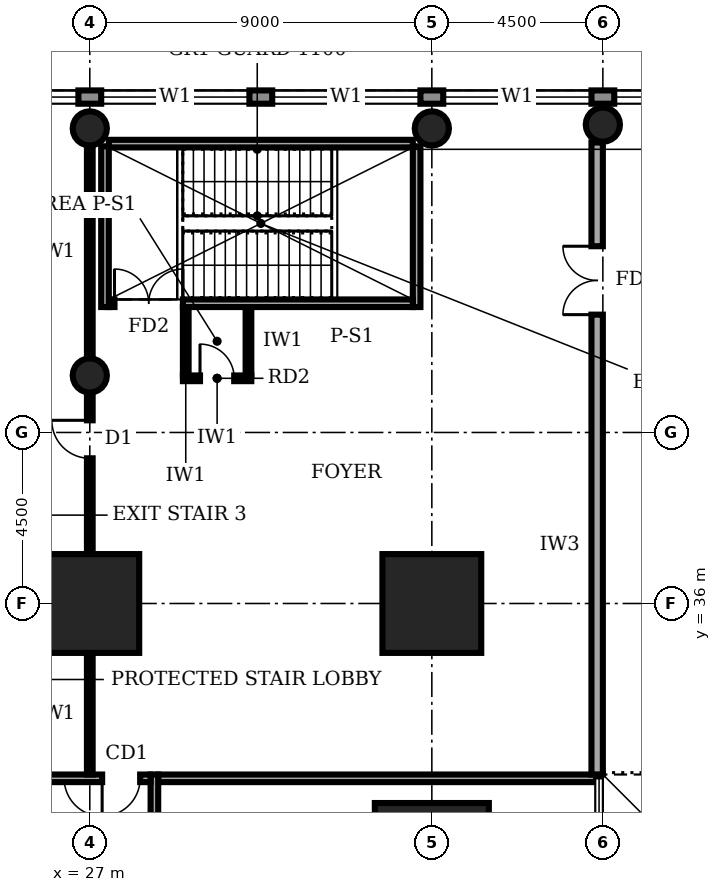
"""IFC4 building model, lengths in metres.
Left out: names, types, materials, properties, quantities, classifications, styles, units other than length and angle.
Written with IfcOpenShell. Run it as: python <this file> out.ifc"""

import sys

from ifc_helpers import new_model, si_unit, direction, frame, frame_2d, origin, origin_2d, place, context, subcontext, project, spatial, rectangle, circle, extrude, element, fill, save


model = new_model("IFC4")
c1 = context("Model", 3, precision=1e-05, world=origin(), true_north=direction((0.0, 1.0)))
c2 = subcontext(c1, "Body", "Model", "MODEL_VIEW")
j1 = project(units=[si_unit("LENGTHUNIT", "METRE"), si_unit("PLANEANGLEUNIT", "RADIAN")], contexts=[c1])
p1 = place(None, origin())
s1 = spatial("IfcSite", under=j1, at=p1, CompositionType="ELEMENT")
p2 = place(p1, origin())
s2 = spatial("IfcBuilding", under=s1, at=p2, CompositionType="ELEMENT")
p3 = place(p2, frame((0.0, 0.0, 11.0)))
s3 = spatial("IfcBuildingStorey", under=s2, at=p3, CompositionType="ELEMENT", Elevation=11.0)
p4 = place(p3, frame((36.0, 29.25, 0.0), z_axis=(0.0, 0.0, 1.0), x_axis=(1.0, 0.0, 0.0)))
e1 = element("IfcColumn", 1, at=p4, inside=s3, PredefinedType="COLUMN", context=c2, shape_type="SweptSolid", body=[
    extrude(rectangle(XDim=3.0, YDim=3.0, at=origin_2d()), origin(), (0.0, 0.0, 1.0), 5.0),
])
for number, where, z_axis, x_axis in (
    (2, (27.0, 36.0, 0.0), (0.0, 0.0, 1.0), (1.0, 0.0, 0.0)),
    (3, (36.0, 36.0, 0.0), (0.0, 0.0, 1.0), (1.0, 0.0, 0.0)),
):
    element("IfcColumn", number, at=place(p3, frame(where, z_axis=z_axis, x_axis=x_axis)), inside=s3, PredefinedType="COLUMN", context=c2, shape_type="SweptSolid", body=[
        extrude(rectangle(XDim=2.6, YDim=2.6, at=origin_2d()), origin(), (0.0, 0.0, 1.0), 5.0),
    ])
for number, where, z_axis, x_axis in (
    (4, (27.0, 42.0, 0.0), (0.0, 0.0, 1.0), (1.0, 0.0, 0.0)),
    (5, (27.0, 48.5, 0.0), (0.0, 0.0, 1.0), (1.0, 0.0, 0.0)),
    (6, (36.0, 48.5, 0.0), (0.0, 0.0, 1.0), (1.0, 0.0, 0.0)),
    (7, (40.5, 48.6, 0.0), (0.0, 0.0, 1.0), (1.0, 0.0, 0.0)),
):
    element("IfcColumn", number, at=place(p3, frame(where, z_axis=z_axis, x_axis=x_axis)), inside=s3, PredefinedType="COLUMN", context=c2, shape_type="SweptSolid", body=[
        extrude(circle(Radius=0.45, at=origin_2d()), origin(), (0.0, 0.0, 1.0), 5.0),
    ])
p5 = place(p3, frame((98.98, 49.325, 0.0), z_axis=(0.0, 0.0, 1.0), x_axis=(-1.0, 0.0, 0.0)))
e8 = element("IfcWall", 8, at=p5, inside=s3, PredefinedType="STANDARD", context=c2, shape_type="SweptSolid", body=[
    extrude(rectangle(XDim=98.96, YDim=0.35, at=frame_2d((49.48, 0.0))), origin(), (0.0, 0.0, 1.0), 4.7),
])
p6 = place(p5, frame((94.71, 0.0, 0.9)))
e9 = element("IfcOpeningElement", 9, at=p6, cuts=e8, PredefinedType="OPENING", context=c2, shape_type="SweptSolid", body=[
    extrude(rectangle(XDim=3.9, YDim=2.2, at=frame_2d((1.95, 1.1))), frame((0.0, 0.185, 0.0), z_axis=(0.0, -1.0, 0.0), x_axis=(1.0, 0.0, 0.0)), (0.0, 0.0, 1.0), 0.37),
])
p7 = place(p5, frame((90.28, 0.0, 0.9)))
e10 = element("IfcOpeningElement", 10, at=p7, cuts=e8, PredefinedType="OPENING", context=c2, shape_type="SweptSolid", body=[
    extrude(rectangle(XDim=3.9, YDim=2.2, at=frame_2d((1.95, 1.1))), frame((0.0, 0.185, 0.0), z_axis=(0.0, -1.0, 0.0), x_axis=(1.0, 0.0, 0.0)), (0.0, 0.0, 1.0), 0.37),
])
p8 = place(p5, frame((85.78, 0.0, 0.9)))
e11 = element("IfcOpeningElement", 11, at=p8, cuts=e8, PredefinedType="OPENING", context=c2, shape_type="SweptSolid", body=[
    extrude(rectangle(XDim=3.9, YDim=2.2, at=frame_2d((1.95, 1.1))), frame((0.0, 0.185, 0.0), z_axis=(0.0, -1.0, 0.0), x_axis=(1.0, 0.0, 0.0)), (0.0, 0.0, 1.0), 0.37),
])
p9 = place(p5, frame((81.28, 0.0, 0.9)))
e12 = element("IfcOpeningElement", 12, at=p9, cuts=e8, PredefinedType="OPENING", context=c2, shape_type="SweptSolid", body=[
    extrude(rectangle(XDim=3.9, YDim=2.2, at=frame_2d((1.95, 1.1))), frame((0.0, 0.185, 0.0), z_axis=(0.0, -1.0, 0.0), x_axis=(1.0, 0.0, 0.0)), (0.0, 0.0, 1.0), 0.37),
])
p10 = place(p5, frame((76.78, 0.0, 0.9)))
e13 = element("IfcOpeningElement", 13, at=p10, cuts=e8, PredefinedType="OPENING", context=c2, shape_type="SweptSolid", body=[
    extrude(rectangle(XDim=3.9, YDim=2.2, at=frame_2d((1.95, 1.1))), frame((0.0, 0.185, 0.0), z_axis=(0.0, -1.0, 0.0), x_axis=(1.0, 0.0, 0.0)), (0.0, 0.0, 1.0), 0.37),
])
p11 = place(p5, frame((72.28, 0.0, 0.9)))
e14 = element("IfcOpeningElement", 14, at=p11, cuts=e8, PredefinedType="OPENING", context=c2, shape_type="SweptSolid", body=[
    extrude(rectangle(XDim=3.9, YDim=2.2, at=frame_2d((1.95, 1.1))), frame((0.0, 0.185, 0.0), z_axis=(0.0, -1.0, 0.0), x_axis=(1.0, 0.0, 0.0)), (0.0, 0.0, 1.0), 0.37),
])
p12 = place(p5, frame((67.78, 0.0, 0.9)))
e15 = element("IfcOpeningElement", 15, at=p12, cuts=e8, PredefinedType="OPENING", context=c2, shape_type="SweptSolid", body=[
    extrude(rectangle(XDim=3.9, YDim=2.2, at=frame_2d((1.95, 1.1))), frame((0.0, 0.185, 0.0), z_axis=(0.0, -1.0, 0.0), x_axis=(1.0, 0.0, 0.0)), (0.0, 0.0, 1.0), 0.37),
])
p13 = place(p5, frame((63.28, 0.0, 0.9)))
e16 = element("IfcOpeningElement", 16, at=p13, cuts=e8, PredefinedType="OPENING", context=c2, shape_type="SweptSolid", body=[
    extrude(rectangle(XDim=3.9, YDim=2.2, at=frame_2d((1.95, 1.1))), frame((0.0, 0.185, 0.0), z_axis=(0.0, -1.0, 0.0), x_axis=(1.0, 0.0, 0.0)), (0.0, 0.0, 1.0), 0.37),
])
p14 = place(p5, frame((58.78, 0.0, 0.9)))
e17 = element("IfcOpeningElement", 17, at=p14, cuts=e8, PredefinedType="OPENING", context=c2, shape_type="SweptSolid", body=[
    extrude(rectangle(XDim=3.9, YDim=2.2, at=frame_2d((1.95, 1.1))), frame((0.0, 0.185, 0.0), z_axis=(0.0, -1.0, 0.0), x_axis=(1.0, 0.0, 0.0)), (0.0, 0.0, 1.0), 0.37),
])
p15 = place(p5, frame((54.28, 0.0, 0.9)))
e18 = element("IfcOpeningElement", 18, at=p15, cuts=e8, PredefinedType="OPENING", context=c2, shape_type="SweptSolid", body=[
    extrude(rectangle(XDim=3.9, YDim=2.2, at=frame_2d((1.95, 1.1))), frame((0.0, 0.185, 0.0), z_axis=(0.0, -1.0, 0.0), x_axis=(1.0, 0.0, 0.0)), (0.0, 0.0, 1.0), 0.37),
])
p16 = place(p5, frame((49.78, 0.0, 0.9)))
e19 = element("IfcOpeningElement", 19, at=p16, cuts=e8, PredefinedType="OPENING", context=c2, shape_type="SweptSolid", body=[
    extrude(rectangle(XDim=3.9, YDim=2.2, at=frame_2d((1.95, 1.1))), frame((0.0, 0.185, 0.0), z_axis=(0.0, -1.0, 0.0), x_axis=(1.0, 0.0, 0.0)), (0.0, 0.0, 1.0), 0.37),
])
p17 = place(p5, frame((45.28, 0.0, 0.9)))
e20 = element("IfcOpeningElement", 20, at=p17, cuts=e8, PredefinedType="OPENING", context=c2, shape_type="SweptSolid", body=[
    extrude(rectangle(XDim=3.9, YDim=2.2, at=frame_2d((1.95, 1.1))), frame((0.0, 0.185, 0.0), z_axis=(0.0, -1.0, 0.0), x_axis=(1.0, 0.0, 0.0)), (0.0, 0.0, 1.0), 0.37),
])
p18 = place(p5, frame((40.78, 0.0, 0.9)))
e21 = element("IfcOpeningElement", 21, at=p18, cuts=e8, PredefinedType="OPENING", context=c2, shape_type="SweptSolid", body=[
    extrude(rectangle(XDim=3.9, YDim=2.2, at=frame_2d((1.95, 1.1))), frame((0.0, 0.185, 0.0), z_axis=(0.0, -1.0, 0.0), x_axis=(1.0, 0.0, 0.0)), (0.0, 0.0, 1.0), 0.37),
])
p19 = place(p5, frame((36.28, 0.0, 0.9)))
e22 = element("IfcOpeningElement", 22, at=p19, cuts=e8, PredefinedType="OPENING", context=c2, shape_type="SweptSolid", body=[
    extrude(rectangle(XDim=3.9, YDim=2.2, at=frame_2d((1.95, 1.1))), frame((0.0, 0.185, 0.0), z_axis=(0.0, -1.0, 0.0), x_axis=(1.0, 0.0, 0.0)), (0.0, 0.0, 1.0), 0.37),
])
p20 = place(p5, frame((31.78, 0.0, 0.9)))
e23 = element("IfcOpeningElement", 23, at=p20, cuts=e8, PredefinedType="OPENING", context=c2, shape_type="SweptSolid", body=[
    extrude(rectangle(XDim=3.9, YDim=2.2, at=frame_2d((1.95, 1.1))), frame((0.0, 0.185, 0.0), z_axis=(0.0, -1.0, 0.0), x_axis=(1.0, 0.0, 0.0)), (0.0, 0.0, 1.0), 0.37),
])
p21 = place(p5, frame((27.28, 0.0, 0.9)))
e24 = element("IfcOpeningElement", 24, at=p21, cuts=e8, PredefinedType="OPENING", context=c2, shape_type="SweptSolid", body=[
    extrude(rectangle(XDim=3.9, YDim=2.2, at=frame_2d((1.95, 1.1))), frame((0.0, 0.185, 0.0), z_axis=(0.0, -1.0, 0.0), x_axis=(1.0, 0.0, 0.0)), (0.0, 0.0, 1.0), 0.37),
])
p22 = place(p5, frame((22.78, 0.0, 0.9)))
e25 = element("IfcOpeningElement", 25, at=p22, cuts=e8, PredefinedType="OPENING", context=c2, shape_type="SweptSolid", body=[
    extrude(rectangle(XDim=3.9, YDim=2.2, at=frame_2d((1.95, 1.1))), frame((0.0, 0.185, 0.0), z_axis=(0.0, -1.0, 0.0), x_axis=(1.0, 0.0, 0.0)), (0.0, 0.0, 1.0), 0.37),
])
p23 = place(p5, frame((18.28, 0.0, 0.9)))
e26 = element("IfcOpeningElement", 26, at=p23, cuts=e8, PredefinedType="OPENING", context=c2, shape_type="SweptSolid", body=[
    extrude(rectangle(XDim=3.9, YDim=2.2, at=frame_2d((1.95, 1.1))), frame((0.0, 0.185, 0.0), z_axis=(0.0, -1.0, 0.0), x_axis=(1.0, 0.0, 0.0)), (0.0, 0.0, 1.0), 0.37),
])
p24 = place(p5, frame((13.78, 0.0, 0.9)))
e27 = element("IfcOpeningElement", 27, at=p24, cuts=e8, PredefinedType="OPENING", context=c2, shape_type="SweptSolid", body=[
    extrude(rectangle(XDim=3.9, YDim=2.2, at=frame_2d((1.95, 1.1))), frame((0.0, 0.185, 0.0), z_axis=(0.0, -1.0, 0.0), x_axis=(1.0, 0.0, 0.0)), (0.0, 0.0, 1.0), 0.37),
])
p25 = place(p5, frame((9.28, 0.0, 0.9)))
e28 = element("IfcOpeningElement", 28, at=p25, cuts=e8, PredefinedType="OPENING", context=c2, shape_type="SweptSolid", body=[
    extrude(rectangle(XDim=3.9, YDim=2.2, at=frame_2d((1.95, 1.1))), frame((0.0, 0.185, 0.0), z_axis=(0.0, -1.0, 0.0), x_axis=(1.0, 0.0, 0.0)), (0.0, 0.0, 1.0), 0.37),
])
p26 = place(p5, frame((4.78, 0.0, 0.9)))
e29 = element("IfcOpeningElement", 29, at=p26, cuts=e8, PredefinedType="OPENING", context=c2, shape_type="SweptSolid", body=[
    extrude(rectangle(XDim=3.9, YDim=2.2, at=frame_2d((1.95, 1.1))), frame((0.0, 0.185, 0.0), z_axis=(0.0, -1.0, 0.0), x_axis=(1.0, 0.0, 0.0)), (0.0, 0.0, 1.0), 0.37),
])
p27 = place(p3, frame((28.7, 9.2, 0.0), z_axis=(0.0, 0.0, 1.0), x_axis=(0.0, 1.0, 0.0)))
e30 = element("IfcWall", 30, at=p27, inside=s3, PredefinedType="SOLIDWALL", context=c2, shape_type="SweptSolid", body=[
    extrude(rectangle(XDim=22.3, YDim=0.2, at=frame_2d((11.15, 0.0))), origin(), (0.0, 0.0, 1.0), 4.7),
])
p28 = place(p27, frame((1.55, 0.0, 0.0)))
e31 = element("IfcOpeningElement", 31, at=p28, cuts=e30, PredefinedType="OPENING", context=c2, shape_type="SweptSolid", body=[
    extrude(rectangle(XDim=1.0, YDim=2.1, at=frame_2d((0.5, 1.05))), frame((0.0, 0.11, 0.0), z_axis=(0.0, -1.0, 0.0), x_axis=(1.0, 0.0, 0.0)), (0.0, 0.0, 1.0), 0.22),
])
p29 = place(p27, frame((6.05, 0.0, 0.0)))
e32 = element("IfcOpeningElement", 32, at=p29, cuts=e30, PredefinedType="OPENING", context=c2, shape_type="SweptSolid", body=[
    extrude(rectangle(XDim=1.0, YDim=2.1, at=frame_2d((0.5, 1.05))), frame((0.0, 0.11, 0.0), z_axis=(0.0, -1.0, 0.0), x_axis=(1.0, 0.0, 0.0)), (0.0, 0.0, 1.0), 0.22),
])
p30 = place(p27, frame((12.4, 0.0, 0.0)))
e33 = element("IfcOpeningElement", 33, at=p30, cuts=e30, PredefinedType="OPENING", context=c2, shape_type="SweptSolid", body=[
    extrude(rectangle(XDim=1.8, YDim=2.1, at=frame_2d((0.9, 1.05))), frame((0.0, 0.11, 0.0), z_axis=(0.0, -1.0, 0.0), x_axis=(1.0, 0.0, 0.0)), (0.0, 0.0, 1.0), 0.22),
])
p31 = place(p27, frame((19.55, 0.0, 0.0)))
e34 = element("IfcOpeningElement", 34, at=p31, cuts=e30, PredefinedType="OPENING", context=c2, shape_type="SweptSolid", body=[
    extrude(rectangle(XDim=1.0, YDim=2.1, at=frame_2d((0.5, 1.05))), frame((0.0, 0.11, 0.0), z_axis=(0.0, -1.0, 0.0), x_axis=(1.0, 0.0, 0.0)), (0.0, 0.0, 1.0), 0.22),
])
p32 = place(p3, frame((28.6, 31.4, 0.0), z_axis=(0.0, 0.0, 1.0), x_axis=(-1.0, 0.0, 0.0)))
e35 = element("IfcWall", 35, at=p32, inside=s3, PredefinedType="SOLIDWALL", context=c2, shape_type="SweptSolid", body=[
    extrude(rectangle(XDim=16.9, YDim=0.2, at=frame_2d((8.45, 0.0))), origin(), (0.0, 0.0, 1.0), 4.7),
])
p33 = place(p32, frame((15.425, 0.0, 0.0)))
e36 = element("IfcOpeningElement", 36, at=p33, cuts=e35, PredefinedType="OPENING", context=c2, shape_type="SweptSolid", body=[
    extrude(rectangle(XDim=1.0, YDim=2.1, at=frame_2d((0.5, 1.05))), frame((0.0, 0.11, 0.0), z_axis=(0.0, -1.0, 0.0), x_axis=(1.0, 0.0, 0.0)), (0.0, 0.0, 1.0), 0.22),
])
p34 = place(p32, frame((9.7, 0.0, 0.0)))
e37 = element("IfcOpeningElement", 37, at=p34, cuts=e35, PredefinedType="OPENING", context=c2, shape_type="SweptSolid", body=[
    extrude(rectangle(XDim=1.8, YDim=2.1, at=frame_2d((0.9, 1.05))), frame((0.0, 0.11, 0.0), z_axis=(0.0, -1.0, 0.0), x_axis=(1.0, 0.0, 0.0)), (0.0, 0.0, 1.0), 0.22),
])
p35 = place(p32, frame((3.35, 0.0, 0.0)))
e38 = element("IfcOpeningElement", 38, at=p35, cuts=e35, PredefinedType="OPENING", context=c2, shape_type="SweptSolid", body=[
    extrude(rectangle(XDim=1.0, YDim=2.1, at=frame_2d((0.5, 1.05))), frame((0.0, 0.11, 0.0), z_axis=(0.0, -1.0, 0.0), x_axis=(1.0, 0.0, 0.0)), (0.0, 0.0, 1.0), 0.22),
])
p36 = place(p32, frame((0.275, 0.0, 0.0)))
e39 = element("IfcOpeningElement", 39, at=p36, cuts=e35, PredefinedType="OPENING", context=c2, shape_type="SweptSolid", body=[
    extrude(rectangle(XDim=1.0, YDim=2.1, at=frame_2d((0.5, 1.05))), frame((0.0, 0.11, 0.0), z_axis=(0.0, -1.0, 0.0), x_axis=(1.0, 0.0, 0.0)), (0.0, 0.0, 1.0), 0.22),
])
p37 = place(p3, frame((28.8, 31.4, 0.0), z_axis=(0.0, 0.0, 1.0), x_axis=(1.0, 0.0, 0.0)))
e40 = element("IfcWall", 40, at=p37, inside=s3, PredefinedType="SOLIDWALL", context=c2, shape_type="SweptSolid", body=[
    extrude(rectangle(XDim=11.52, YDim=0.2, at=frame_2d((5.76, 0.0))), origin(), (0.0, 0.0, 1.0), 4.7),
])
p38 = place(p3, frame((27.0, 31.5, 0.0), z_axis=(0.0, 0.0, 1.0), x_axis=(0.0, 1.0, 0.0)))
e41 = element("IfcWall", 41, at=p38, inside=s3, PredefinedType="PARTITIONING", context=c2, shape_type="SweptSolid", body=[
    extrude(rectangle(XDim=3.18, YDim=0.15, at=frame_2d((1.59, 0.0))), origin(), (0.0, 0.0, 1.0), 3.8),
])
p39 = place(p3, frame((27.0, 37.32, 0.0), z_axis=(0.0, 0.0, 1.0), x_axis=(0.0, 1.0, 0.0)))
e42 = element("IfcWall", 42, at=p39, inside=s3, PredefinedType="PARTITIONING", context=c2, shape_type="SweptSolid", body=[
    extrude(rectangle(XDim=4.21, YDim=0.15, at=frame_2d((2.105, 0.0))), origin(), (0.0, 0.0, 1.0), 3.7),
])
p40 = place(p39, frame((2.5, 0.0, 0.0)))
e43 = element("IfcOpeningElement", 43, at=p40, cuts=e42, PredefinedType="OPENING", context=c2, shape_type="SweptSolid", body=[
    extrude(rectangle(XDim=1.0, YDim=2.1, at=frame_2d((0.5, 1.05))), frame((0.0, 0.085, 0.0), z_axis=(0.0, -1.0, 0.0), x_axis=(1.0, 0.0, 0.0)), (0.0, 0.0, 1.0), 0.17),
])
p41 = place(p3, frame((27.0, 42.47, 0.0), z_axis=(0.0, 0.0, 1.0), x_axis=(0.0, 1.0, 0.0)))
e44 = element("IfcWall", 44, at=p41, inside=s3, PredefinedType="PARTITIONING", context=c2, shape_type="SweptSolid", body=[
    extrude(rectangle(XDim=5.56, YDim=0.15, at=frame_2d((2.78, 0.0))), origin(), (0.0, 0.0, 1.0), 3.7),
])
p42 = place(p3, frame((27.5, 43.9, 0.0), z_axis=(0.0, 0.0, 1.0), x_axis=(1.0, 0.0, 0.0)))
e45 = element("IfcWall", 45, at=p42, inside=s3, PredefinedType="SOLIDWALL", context=c2, shape_type="SweptSolid", body=[
    extrude(rectangle(XDim=8.0, YDim=0.2, at=frame_2d((4.0, 0.0))), origin(), (0.0, 0.0, 1.0), 4.7),
])
p43 = place(p42, frame((0.15, 0.0, 0.0)))
e46 = element("IfcOpeningElement", 46, at=p43, cuts=e45, PredefinedType="OPENING", context=c2, shape_type="SweptSolid", body=[
    extrude(rectangle(XDim=1.8, YDim=2.1, at=frame_2d((0.9, 1.05))), frame((0.0, 0.11, 0.0), z_axis=(0.0, -1.0, 0.0), x_axis=(1.0, 0.0, 0.0)), (0.0, 0.0, 1.0), 0.22),
])
p44 = place(p3, frame((27.5, 48.1, 0.0), z_axis=(0.0, 0.0, 1.0), x_axis=(1.0, 0.0, 0.0)))
e47 = element("IfcWall", 47, at=p44, inside=s3, PredefinedType="SOLIDWALL", context=c2, shape_type="SweptSolid", body=[
    extrude(rectangle(XDim=8.0, YDim=0.2, at=frame_2d((4.0, 0.0))), origin(), (0.0, 0.0, 1.0), 4.7),
])
for number, where, z_axis, x_axis in (
    (48, (27.4, 43.8, 0.0), (0.0, 0.0, 1.0), (0.0, 1.0, 0.0)),
    (49, (35.6, 43.8, 0.0), (0.0, 0.0, 1.0), (0.0, 1.0, 0.0)),
):
    element("IfcWall", number, at=place(p3, frame(where, z_axis=z_axis, x_axis=x_axis)), inside=s3, PredefinedType="SOLIDWALL", context=c2, shape_type="SweptSolid", body=[
        extrude(rectangle(XDim=4.23, YDim=0.2, at=frame_2d((2.115, 0.0))), origin(), (0.0, 0.0, 1.0), 4.7),
    ])
p45 = place(p3, frame((40.35, 31.5, 0.0), z_axis=(0.0, 0.0, 1.0), x_axis=(0.0, 1.0, 0.0)))
e50 = element("IfcWall", 50, at=p45, inside=s3, PredefinedType="SOLIDWALL", context=c2, shape_type="SweptSolid", body=[
    extrude(rectangle(XDim=16.63, YDim=0.3, at=frame_2d((8.315, 0.0))), origin(), (0.0, 0.0, 1.0), 4.7),
])
p46 = place(p45, frame((12.1, 0.0, 0.0)))
e51 = element("IfcOpeningElement", 51, at=p46, cuts=e50, PredefinedType="OPENING", context=c2, shape_type="SweptSolid", body=[
    extrude(rectangle(XDim=1.8, YDim=2.1, at=frame_2d((0.9, 1.05))), frame((0.0, 0.16, 0.0), z_axis=(0.0, -1.0, 0.0), x_axis=(1.0, 0.0, 0.0)), (0.0, 0.0, 1.0), 0.32),
])
p47 = place(p3, frame((31.175, 42.0, 0.0), z_axis=(0.0, 0.0, 1.0), x_axis=(0.0, 1.0, 0.0)))
e52 = element("IfcWall", 52, at=p47, inside=s3, PredefinedType="PARTITIONING", context=c2, shape_type="SweptSolid", body=[
    extrude(rectangle(XDim=1.8, YDim=0.15, at=frame_2d((0.9, 0.0))), origin(), (0.0, 0.0, 1.0), 4.7),
])
p48 = place(p3, frame((29.45, 41.925, 0.0), z_axis=(0.0, 0.0, 1.0), x_axis=(1.0, 0.0, 0.0)))
e53 = element("IfcWall", 53, at=p48, inside=s3, PredefinedType="PARTITIONING", context=c2, shape_type="SweptSolid", body=[
    extrude(rectangle(XDim=1.8, YDim=0.15, at=frame_2d((0.9, 0.0))), origin(), (0.0, 0.0, 1.0), 4.7),
])
p49 = place(p48, frame((0.45, 0.0, 0.0)))
e54 = element("IfcOpeningElement", 54, at=p49, cuts=e53, PredefinedType="OPENING", context=c2, shape_type="SweptSolid", body=[
    extrude(rectangle(XDim=0.9, YDim=2.1, at=frame_2d((0.45, 1.05))), frame((0.0, 0.085, 0.0), z_axis=(0.0, -1.0, 0.0), x_axis=(1.0, 0.0, 0.0)), (0.0, 0.0, 1.0), 0.17),
])
p50 = place(p3, frame((29.525, 42.0, 0.0), z_axis=(0.0, 0.0, 1.0), x_axis=(0.0, 1.0, 0.0)))
e55 = element("IfcWall", 55, at=p50, inside=s3, PredefinedType="PARTITIONING", context=c2, shape_type="SweptSolid", body=[
    extrude(rectangle(XDim=1.8, YDim=0.15, at=frame_2d((0.9, 0.0))), origin(), (0.0, 0.0, 1.0), 4.7),
])
p51 = place(p11, origin())
e56 = element("IfcWindow", 56, at=p51, inside=s3, PartitioningType="SINGLE_PANEL", PredefinedType="WINDOW", context=c2, shape_type="SweptSolid", body=[
    extrude(rectangle(XDim=3.9, YDim=2.2, at=frame_2d((1.95, 1.1))), frame((0.0, 0.03, 0.0), z_axis=(0.0, -1.0, 0.0), x_axis=(1.0, 0.0, 0.0)), (0.0, 0.0, 1.0), 0.06),
])
fill(e14, e56)
p52 = place(p12, origin())
e57 = element("IfcWindow", 57, at=p52, inside=s3, PartitioningType="SINGLE_PANEL", PredefinedType="WINDOW", context=c2, shape_type="SweptSolid", body=[
    extrude(rectangle(XDim=3.9, YDim=2.2, at=frame_2d((1.95, 1.1))), frame((0.0, 0.03, 0.0), z_axis=(0.0, -1.0, 0.0), x_axis=(1.0, 0.0, 0.0)), (0.0, 0.0, 1.0), 0.06),
])
fill(e15, e57)
p53 = place(p13, origin())
e58 = element("IfcWindow", 58, at=p53, inside=s3, PartitioningType="SINGLE_PANEL", PredefinedType="WINDOW", context=c2, shape_type="SweptSolid", body=[
    extrude(rectangle(XDim=3.9, YDim=2.2, at=frame_2d((1.95, 1.1))), frame((0.0, 0.03, 0.0), z_axis=(0.0, -1.0, 0.0), x_axis=(1.0, 0.0, 0.0)), (0.0, 0.0, 1.0), 0.06),
])
fill(e16, e58)
p54 = place(p14, origin())
e59 = element("IfcWindow", 59, at=p54, inside=s3, PartitioningType="SINGLE_PANEL", PredefinedType="WINDOW", context=c2, shape_type="SweptSolid", body=[
    extrude(rectangle(XDim=3.9, YDim=2.2, at=frame_2d((1.95, 1.1))), frame((0.0, 0.03, 0.0), z_axis=(0.0, -1.0, 0.0), x_axis=(1.0, 0.0, 0.0)), (0.0, 0.0, 1.0), 0.06),
])
fill(e17, e59)
p55 = place(p15, origin())
e60 = element("IfcWindow", 60, at=p55, inside=s3, PartitioningType="SINGLE_PANEL", PredefinedType="WINDOW", context=c2, shape_type="SweptSolid", body=[
    extrude(rectangle(XDim=3.9, YDim=2.2, at=frame_2d((1.95, 1.1))), frame((0.0, 0.03, 0.0), z_axis=(0.0, -1.0, 0.0), x_axis=(1.0, 0.0, 0.0)), (0.0, 0.0, 1.0), 0.06),
])
fill(e18, e60)
p56 = place(p36, origin())
e61 = element("IfcDoor", 61, at=p56, inside=s3, OperationType="SINGLE_SWING_RIGHT", PredefinedType="DOOR", context=c2, shape_type="SweptSolid", body=[
    extrude(rectangle(XDim=1.0, YDim=2.1, at=frame_2d((0.5, 1.05))), frame((0.0, 0.025, 0.0), z_axis=(0.0, -1.0, 0.0), x_axis=(1.0, 0.0, 0.0)), (0.0, 0.0, 1.0), 0.05),
])
fill(e39, e61)
p57 = place(p40, origin())
e62 = element("IfcDoor", 62, at=p57, inside=s3, OperationType="SINGLE_SWING_RIGHT", PredefinedType="DOOR", context=c2, shape_type="SweptSolid", body=[
    extrude(rectangle(XDim=1.0, YDim=2.1, at=frame_2d((0.5, 1.05))), frame((0.0, 0.025, 0.0), z_axis=(0.0, -1.0, 0.0), x_axis=(1.0, 0.0, 0.0)), (0.0, 0.0, 1.0), 0.05),
])
fill(e43, e62)
p58 = place(p43, origin())
e63 = element("IfcDoor", 63, at=p58, inside=s3, OperationType="DOUBLE_DOOR_SINGLE_SWING", PredefinedType="DOOR", context=c2, shape_type="SweptSolid", body=[
    extrude(rectangle(XDim=1.8, YDim=2.1, at=frame_2d((0.9, 1.05))), frame((0.0, 0.025, 0.0), z_axis=(0.0, -1.0, 0.0), x_axis=(1.0, 0.0, 0.0)), (0.0, 0.0, 1.0), 0.05),
])
fill(e46, e63)
p59 = place(p46, origin())
e64 = element("IfcDoor", 64, at=p59, inside=s3, OperationType="DOUBLE_DOOR_SINGLE_SWING", PredefinedType="DOOR", context=c2, shape_type="SweptSolid", body=[
    extrude(rectangle(XDim=1.8, YDim=2.1, at=frame_2d((0.9, 1.05))), frame((0.0, 0.025, 0.0), z_axis=(0.0, -1.0, 0.0), x_axis=(1.0, 0.0, 0.0)), (0.0, 0.0, 1.0), 0.05),
])
fill(e51, e64)
p60 = place(p49, origin())
e65 = element("IfcDoor", 65, at=p60, inside=s3, OperationType="SINGLE_SWING_LEFT", PredefinedType="DOOR", context=c2, shape_type="SweptSolid", body=[
    extrude(rectangle(XDim=0.9, YDim=2.1, at=frame_2d((0.45, 1.05))), frame((0.0, 0.025, 0.0), z_axis=(0.0, -1.0, 0.0), x_axis=(1.0, 0.0, 0.0)), (0.0, 0.0, 1.0), 0.05),
])
fill(e54, e65)
save(model, sys.argv[1])
